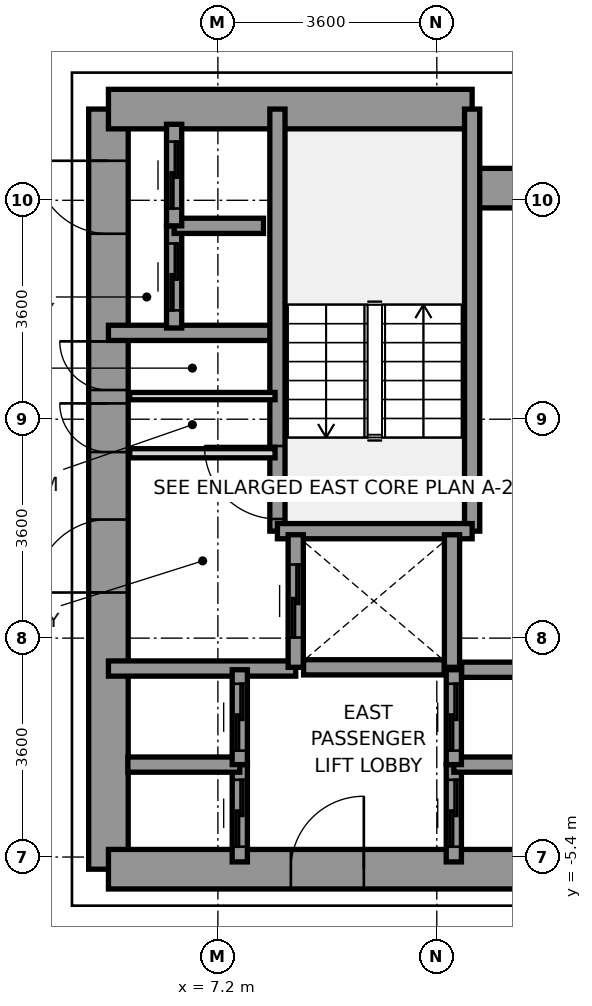
"""IFC4 building model, lengths in metres.
Left out: names, types, materials, properties, quantities, classifications, styles, units other than length and angle.
Written with IfcOpenShell. Run it as: python <this file> out.ifc"""

import sys

from ifc_helpers import new_model, si_unit, direction, frame, frame_2d, origin, place, context, subcontext, project, spatial, rectangle, extrude, source, transform, mapped, element, fill, save


model = new_model("IFC4")
c1 = context("Model", 3, precision=1e-05, world=origin(), true_north=direction((0.0, 1.0)))
c2 = subcontext(c1, "Body", "Model", "MODEL_VIEW")
j1 = project(units=[si_unit("LENGTHUNIT", "METRE"), si_unit("PLANEANGLEUNIT", "RADIAN")], contexts=[c1])
p1 = place(None, origin())
s1 = spatial("IfcSite", under=j1, at=p1, CompositionType="ELEMENT")
p2 = place(p1, origin())
s2 = spatial("IfcBuilding", under=s1, at=p2, CompositionType="ELEMENT")
p3 = place(p2, origin())
s3 = spatial("IfcBuildingStorey", under=s2, at=p3, CompositionType="ELEMENT", Elevation=0.0)
p4 = place(p3, frame((5.4, -5.6, 0.0), z_axis=(0.0, 0.0, 1.0), x_axis=(0.0, 1.0, 0.0)))
e1 = element("IfcWall", 1, at=p4, inside=s3, PredefinedType="SHEAR", context=c2, shape_type="SweptSolid", body=[
    extrude(rectangle(XDim=12.5, YDim=0.65, at=frame_2d((6.25, 0.0))), origin(), (0.0, 0.0, 1.0), 5.15),
])
p5 = place(p4, frame((4.55, 0.0, 0.0)))
e2 = element("IfcOpeningElement", 2, at=p5, cuts=e1, PredefinedType="OPENING", context=c2, shape_type="SweptSolid", body=[
    extrude(rectangle(XDim=1.2, YDim=2.2, at=frame_2d((0.6, 1.1))), frame((0.0, 0.335, 0.0), z_axis=(0.0, -1.0, 0.0), x_axis=(1.0, 0.0, 0.0)), (0.0, 0.0, 1.0), 0.67),
])
p6 = place(p4, frame((10.45, 0.0, 0.0)))
e3 = element("IfcOpeningElement", 3, at=p6, cuts=e1, PredefinedType="OPENING", context=c2, shape_type="SweptSolid", body=[
    extrude(rectangle(XDim=1.2, YDim=2.2, at=frame_2d((0.6, 1.1))), frame((0.0, 0.335, 0.0), z_axis=(0.0, -1.0, 0.0), x_axis=(1.0, 0.0, 0.0)), (0.0, 0.0, 1.0), 0.67),
])
p7 = place(p4, frame((6.86, 0.0, 0.0)))
e4 = element("IfcOpeningElement", 4, at=p7, cuts=e1, PredefinedType="OPENING", context=c2, shape_type="SweptSolid", body=[
    extrude(rectangle(XDim=0.8, YDim=2.1, at=frame_2d((0.4, 1.05))), frame((0.0, 0.335, 0.0), z_axis=(0.0, -1.0, 0.0), x_axis=(1.0, 0.0, 0.0)), (0.0, 0.0, 1.0), 0.67),
])
p8 = place(p4, frame((7.88, 0.0, 0.0)))
e5 = element("IfcOpeningElement", 5, at=p8, cuts=e1, PredefinedType="OPENING", context=c2, shape_type="SweptSolid", body=[
    extrude(rectangle(XDim=0.8, YDim=2.1, at=frame_2d((0.4, 1.05))), frame((0.0, 0.335, 0.0), z_axis=(0.0, -1.0, 0.0), x_axis=(1.0, 0.0, 0.0)), (0.0, 0.0, 1.0), 0.67),
])
p9 = place(p3, frame((5.4, 6.9, 0.0), z_axis=(0.0, 0.0, 1.0), x_axis=(1.0, 0.0, 0.0)))
e6 = element("IfcWall", 6, at=p9, inside=s3, PredefinedType="SHEAR", context=c2, shape_type="SweptSolid", body=[
    extrude(rectangle(XDim=5.981, YDim=0.65, at=frame_2d((2.991, 0.0))), origin(), (0.0, 0.0, 1.0), 5.15),
])
p10 = place(p3, frame((11.381, 5.6, 0.0), z_axis=(0.0, 0.0, 1.0), x_axis=(1.0, 0.0, 0.0)))
e7 = element("IfcWall", 7, at=p10, inside=s3, PredefinedType="SHEAR", context=c2, shape_type="SweptSolid", body=[
    extrude(rectangle(XDim=1.819, YDim=0.65, at=frame_2d((0.909, 0.0))), origin(), (0.0, 0.0, 1.0), 5.15),
])
p11 = place(p3, frame((5.4, -5.6, 0.0), z_axis=(0.0, 0.0, 1.0), x_axis=(1.0, 0.0, 0.0)))
e8 = element("IfcWall", 8, at=p11, inside=s3, PredefinedType="SHEAR", context=c2, shape_type="SweptSolid", body=[
    extrude(rectangle(XDim=7.8, YDim=0.65, at=frame_2d((3.9, 0.0))), origin(), (0.0, 0.0, 1.0), 5.15),
])
p12 = place(p11, frame((3.0, 0.0, 0.0)))
e9 = element("IfcOpeningElement", 9, at=p12, cuts=e8, PredefinedType="OPENING", context=c2, shape_type="SweptSolid", body=[
    extrude(rectangle(XDim=1.2, YDim=2.2, at=frame_2d((0.6, 1.1))), frame((0.0, 0.335, 0.0), z_axis=(0.0, -1.0, 0.0), x_axis=(1.0, 0.0, 0.0)), (0.0, 0.0, 1.0), 0.67),
])
p13 = place(p3, frame((5.4, 3.22, 0.0), z_axis=(0.0, 0.0, 1.0), x_axis=(1.0, 0.0, 0.0)))
e10 = element("IfcWall", 10, at=p13, inside=s3, PredefinedType="SOLIDWALL", context=c2, shape_type="SweptSolid", body=[
    extrude(rectangle(XDim=2.78, YDim=0.25, at=frame_2d((1.39, 0.0))), origin(), (0.0, 0.0, 1.0), 5.15),
])
p14 = place(p3, frame((5.4, -2.3, 0.0), z_axis=(0.0, 0.0, 1.0), x_axis=(1.0, 0.0, 0.0)))
e11 = element("IfcWall", 11, at=p14, inside=s3, PredefinedType="SOLIDWALL", context=c2, shape_type="SweptSolid", body=[
    extrude(rectangle(XDim=3.08, YDim=0.25, at=frame_2d((1.54, 0.0))), origin(), (0.0, 0.0, 1.0), 5.15),
])
p15 = place(p3, frame((8.179, -0.041, 0.0), z_axis=(0.0, 0.0, 1.0), x_axis=(0.0, 1.0, 0.0)))
e12 = element("IfcWall", 12, at=p15, inside=s3, PredefinedType="SOLIDWALL", context=c2, shape_type="SweptSolid", body=[
    extrude(rectangle(XDim=6.941, YDim=0.25, at=frame_2d((3.47, 0.0))), origin(), (0.0, 0.0, 1.0), 5.15),
])
p16 = place(p15, frame((0.2, 0.0, 0.0)))
e13 = element("IfcOpeningElement", 13, at=p16, cuts=e12, PredefinedType="OPENING", context=c2, shape_type="SweptSolid", body=[
    extrude(rectangle(XDim=1.2, YDim=2.2, at=frame_2d((0.6, 1.1))), frame((0.0, 0.135, 0.0), z_axis=(0.0, -1.0, 0.0), x_axis=(1.0, 0.0, 0.0)), (0.0, 0.0, 1.0), 0.27),
])
p17 = place(p3, frame((11.381, -0.041, 0.0), z_axis=(0.0, 0.0, 1.0), x_axis=(0.0, 1.0, 0.0)))
e14 = element("IfcWall", 14, at=p17, inside=s3, PredefinedType="SOLIDWALL", context=c2, shape_type="SweptSolid", body=[
    extrude(rectangle(XDim=6.941, YDim=0.25, at=frame_2d((3.47, 0.0))), origin(), (0.0, 0.0, 1.0), 5.15),
])
p18 = place(p3, frame((8.179, -0.041, 0.0), z_axis=(0.0, 0.0, 1.0), x_axis=(1.0, 0.0, 0.0)))
e15 = element("IfcWall", 15, at=p18, inside=s3, PredefinedType="SOLIDWALL", context=c2, shape_type="SweptSolid", body=[
    extrude(rectangle(XDim=3.202, YDim=0.25, at=frame_2d((1.601, 0.0))), origin(), (0.0, 0.0, 1.0), 5.15),
])
p19 = place(p3, frame((8.48, -2.28, 0.0), z_axis=(0.0, 0.0, 1.0), x_axis=(0.0, 1.0, 0.0)))
e16 = element("IfcWall", 16, at=p19, inside=s3, PredefinedType="SOLIDWALL", context=c2, shape_type="SweptSolid", body=[
    extrude(rectangle(XDim=2.18, YDim=0.25, at=frame_2d((1.09, 0.0))), origin(), (0.0, 0.0, 1.0), 5.15),
])
p20 = place(p19, frame((0.49, 0.0, 0.0)))
e17 = element("IfcOpeningElement", 17, at=p20, cuts=e16, PredefinedType="OPENING", context=c2, shape_type="SweptSolid", body=[
    extrude(rectangle(XDim=1.2, YDim=2.2, at=frame_2d((0.6, 1.1))), frame((0.0, 0.135, 0.0), z_axis=(0.0, -1.0, 0.0), x_axis=(1.0, 0.0, 0.0)), (0.0, 0.0, 1.0), 0.27),
])
p21 = place(p3, frame((11.05, -2.28, 0.0), z_axis=(0.0, 0.0, 1.0), x_axis=(0.0, 1.0, 0.0)))
e18 = element("IfcWall", 18, at=p21, inside=s3, PredefinedType="SOLIDWALL", context=c2, shape_type="SweptSolid", body=[
    extrude(rectangle(XDim=2.18, YDim=0.25, at=frame_2d((1.09, 0.0))), origin(), (0.0, 0.0, 1.0), 5.15),
])
p22 = place(p3, frame((8.609, -2.28, 0.0), z_axis=(0.0, 0.0, 1.0), x_axis=(1.0, 0.0, 0.0)))
e19 = element("IfcWall", 19, at=p22, inside=s3, PredefinedType="SOLIDWALL", context=c2, shape_type="SweptSolid", body=[
    extrude(rectangle(XDim=2.312, YDim=0.25, at=frame_2d((1.156, 0.0))), origin(), (0.0, 0.0, 1.0), 5.15),
])
p23 = place(p3, frame((11.08, -5.48, 0.0), z_axis=(0.0, 0.0, 1.0), x_axis=(0.0, 1.0, 0.0)))
e20 = element("IfcWall", 20, at=p23, inside=s3, PredefinedType="SOLIDWALL", context=c2, shape_type="SweptSolid", body=[
    extrude(rectangle(XDim=1.6, YDim=0.25, at=frame_2d((0.8, 0.0))), origin(), (0.0, 0.0, 1.0), 5.15),
])
p24 = place(p23, frame((0.25, 0.0, 0.0)))
e21 = element("IfcOpeningElement", 21, at=p24, cuts=e20, PredefinedType="OPENING", context=c2, shape_type="SweptSolid", body=[
    extrude(rectangle(XDim=1.1, YDim=2.2, at=frame_2d((0.55, 1.1))), frame((0.0, 0.135, 0.0), z_axis=(0.0, -1.0, 0.0), x_axis=(1.0, 0.0, 0.0)), (0.0, 0.0, 1.0), 0.27),
])
p25 = place(p3, frame((11.08, -3.88, 0.0), z_axis=(0.0, 0.0, 1.0), x_axis=(1.0, 0.0, 0.0)))
e22 = element("IfcWall", 22, at=p25, inside=s3, PredefinedType="SOLIDWALL", context=c2, shape_type="SweptSolid", body=[
    extrude(rectangle(XDim=1.84, YDim=0.25, at=frame_2d((0.92, 0.0))), origin(), (0.0, 0.0, 1.0), 5.15),
])
p26 = place(p3, frame((11.08, -3.88, 0.0), z_axis=(0.0, 0.0, 1.0), x_axis=(0.0, 1.0, 0.0)))
e23 = element("IfcWall", 23, at=p26, inside=s3, PredefinedType="SOLIDWALL", context=c2, shape_type="SweptSolid", body=[
    extrude(rectangle(XDim=1.56, YDim=0.25, at=frame_2d((0.78, 0.0))), origin(), (0.0, 0.0, 1.0), 5.15),
])
p27 = place(p26, frame((0.23, 0.0, 0.0)))
e24 = element("IfcOpeningElement", 24, at=p27, cuts=e23, PredefinedType="OPENING", context=c2, shape_type="SweptSolid", body=[
    extrude(rectangle(XDim=1.1, YDim=2.2, at=frame_2d((0.55, 1.1))), frame((0.0, 0.135, 0.0), z_axis=(0.0, -1.0, 0.0), x_axis=(1.0, 0.0, 0.0)), (0.0, 0.0, 1.0), 0.27),
])
p28 = place(p3, frame((11.209, -2.32, 0.0), z_axis=(0.0, 0.0, 1.0), x_axis=(1.0, 0.0, 0.0)))
e25 = element("IfcWall", 25, at=p28, inside=s3, PredefinedType="SOLIDWALL", context=c2, shape_type="SweptSolid", body=[
    extrude(rectangle(XDim=1.582, YDim=0.25, at=frame_2d((0.791, 0.0))), origin(), (0.0, 0.0, 1.0), 5.15),
])
p29 = place(p3, frame((7.56, -5.48, 0.0), z_axis=(0.0, 0.0, 1.0), x_axis=(0.0, 1.0, 0.0)))
e26 = element("IfcWall", 26, at=p29, inside=s3, PredefinedType="SOLIDWALL", context=c2, shape_type="SweptSolid", body=[
    extrude(rectangle(XDim=1.6, YDim=0.25, at=frame_2d((0.8, 0.0))), origin(), (0.0, 0.0, 1.0), 5.15),
])
p30 = place(p29, frame((0.25, 0.0, 0.0)))
e27 = element("IfcOpeningElement", 27, at=p30, cuts=e26, PredefinedType="OPENING", context=c2, shape_type="SweptSolid", body=[
    extrude(rectangle(XDim=1.1, YDim=2.2, at=frame_2d((0.55, 1.1))), frame((0.0, 0.135, 0.0), z_axis=(0.0, -1.0, 0.0), x_axis=(1.0, 0.0, 0.0)), (0.0, 0.0, 1.0), 0.27),
])
p31 = place(p3, frame((5.72, -3.88, 0.0), z_axis=(0.0, 0.0, 1.0), x_axis=(1.0, 0.0, 0.0)))
e28 = element("IfcWall", 28, at=p31, inside=s3, PredefinedType="SOLIDWALL", context=c2, shape_type="SweptSolid", body=[
    extrude(rectangle(XDim=1.84, YDim=0.25, at=frame_2d((0.92, 0.0))), origin(), (0.0, 0.0, 1.0), 5.15),
])
p32 = place(p3, frame((7.56, -3.88, 0.0), z_axis=(0.0, 0.0, 1.0), x_axis=(0.0, 1.0, 0.0)))
e29 = element("IfcWall", 29, at=p32, inside=s3, PredefinedType="SOLIDWALL", context=c2, shape_type="SweptSolid", body=[
    extrude(rectangle(XDim=1.56, YDim=0.25, at=frame_2d((0.78, 0.0))), origin(), (0.0, 0.0, 1.0), 5.15),
])
p33 = place(p32, frame((0.23, 0.0, 0.0)))
e30 = element("IfcOpeningElement", 30, at=p33, cuts=e29, PredefinedType="OPENING", context=c2, shape_type="SweptSolid", body=[
    extrude(rectangle(XDim=1.1, YDim=2.2, at=frame_2d((0.55, 1.1))), frame((0.0, 0.135, 0.0), z_axis=(0.0, -1.0, 0.0), x_axis=(1.0, 0.0, 0.0)), (0.0, 0.0, 1.0), 0.27),
])
p34 = place(p3, frame((6.48, 3.3, 0.0), z_axis=(0.0, 0.0, 1.0), x_axis=(0.0, 1.0, 0.0)))
e31 = element("IfcWall", 31, at=p34, inside=s3, PredefinedType="SOLIDWALL", context=c2, shape_type="SweptSolid", body=[
    extrude(rectangle(XDim=1.68, YDim=0.25, at=frame_2d((0.84, 0.0))), origin(), (0.0, 0.0, 1.0), 5.15),
])
p35 = place(p34, frame((0.29, 0.0, 0.0)))
e32 = element("IfcOpeningElement", 32, at=p35, cuts=e31, PredefinedType="OPENING", context=c2, shape_type="SweptSolid", body=[
    extrude(rectangle(XDim=1.1, YDim=2.2, at=frame_2d((0.55, 1.1))), frame((0.0, 0.135, 0.0), z_axis=(0.0, -1.0, 0.0), x_axis=(1.0, 0.0, 0.0)), (0.0, 0.0, 1.0), 0.27),
])
p36 = place(p3, frame((6.48, 4.98, 0.0), z_axis=(0.0, 0.0, 1.0), x_axis=(1.0, 0.0, 0.0)))
e33 = element("IfcWall", 33, at=p36, inside=s3, PredefinedType="SOLIDWALL", context=c2, shape_type="SweptSolid", body=[
    extrude(rectangle(XDim=1.47, YDim=0.25, at=frame_2d((0.735, 0.0))), origin(), (0.0, 0.0, 1.0), 5.15),
])
p37 = place(p3, frame((6.48, 4.98, 0.0), z_axis=(0.0, 0.0, 1.0), x_axis=(0.0, 1.0, 0.0)))
e34 = element("IfcWall", 34, at=p37, inside=s3, PredefinedType="SOLIDWALL", context=c2, shape_type="SweptSolid", body=[
    extrude(rectangle(XDim=1.67, YDim=0.25, at=frame_2d((0.835, 0.0))), origin(), (0.0, 0.0, 1.0), 5.15),
])
p38 = place(p37, frame((0.285, 0.0, 0.0)))
e35 = element("IfcOpeningElement", 35, at=p38, cuts=e34, PredefinedType="OPENING", context=c2, shape_type="SweptSolid", body=[
    extrude(rectangle(XDim=1.1, YDim=2.2, at=frame_2d((0.55, 1.1))), frame((0.0, 0.135, 0.0), z_axis=(0.0, -1.0, 0.0), x_axis=(1.0, 0.0, 0.0)), (0.0, 0.0, 1.0), 0.27),
])
p39 = place(p3, frame((5.75, 1.24, 0.0), z_axis=(0.0, 0.0, 1.0), x_axis=(1.0, 0.0, 0.0)))
e36 = element("IfcWall", 36, at=p39, inside=s3, PredefinedType="PARTITIONING", context=c2, shape_type="SweptSolid", body=[
    extrude(rectangle(XDim=2.39, YDim=0.15, at=frame_2d((1.195, 0.0))), origin(), (0.0, 0.0, 1.0), 4.25),
])
p40 = place(p3, frame((5.75, 2.18, 0.0), z_axis=(0.0, 0.0, 1.0), x_axis=(1.0, 0.0, 0.0)))
e37 = element("IfcWall", 37, at=p40, inside=s3, PredefinedType="PARTITIONING", context=c2, shape_type="SweptSolid", body=[
    extrude(rectangle(XDim=2.39, YDim=0.12, at=frame_2d((1.195, 0.0))), origin(), (0.0, 0.0, 1.0), 4.25),
])
m1 = source(origin(), c2, "Body", "SweptSolid", [
    extrude(rectangle(XDim=1.2, YDim=2.2, at=frame_2d((0.6, 1.1))), frame((0.0, 0.025, 0.0), z_axis=(0.0, -1.0, 0.0), x_axis=(1.0, 0.0, 0.0)), (0.0, 0.0, 1.0), 0.05),
])
p41 = place(p16, origin())
e38 = element("IfcDoor", 38, at=p41, inside=s3, OperationType="SINGLE_SWING_RIGHT", PredefinedType="DOOR", context=c2, shape_type="MappedRepresentation", body=[
    mapped(m1, transform((0.0, 0.0, 0.0), x_axis=(1.0, 0.0, 0.0), y_axis=(0.0, 1.0, 0.0), z_axis=(0.0, 0.0, 1.0), scale=1.0)),
])
fill(e13, e38)
p42 = place(p5, origin())
e39 = element("IfcDoor", 39, at=p42, inside=s3, OperationType="SINGLE_SWING_LEFT", PredefinedType="DOOR", context=c2, shape_type="MappedRepresentation", body=[
    mapped(m1, transform((0.0, 0.0, 0.0), x_axis=(1.0, 0.0, 0.0), y_axis=(0.0, 1.0, 0.0), z_axis=(0.0, 0.0, 1.0), scale=1.0)),
])
fill(e2, e39)
p43 = place(p6, origin())
e40 = element("IfcDoor", 40, at=p43, inside=s3, OperationType="SINGLE_SWING_RIGHT", PredefinedType="DOOR", context=c2, shape_type="MappedRepresentation", body=[
    mapped(m1, transform((0.0, 0.0, 0.0), x_axis=(1.0, 0.0, 0.0), y_axis=(0.0, 1.0, 0.0), z_axis=(0.0, 0.0, 1.0), scale=1.0)),
])
fill(e3, e40)
p44 = place(p12, origin())
e41 = element("IfcDoor", 41, at=p44, inside=s3, OperationType="SINGLE_SWING_RIGHT", PredefinedType="DOOR", context=c2, shape_type="MappedRepresentation", body=[
    mapped(m1, transform((0.0, 0.0, 0.0), x_axis=(1.0, 0.0, 0.0), y_axis=(0.0, 1.0, 0.0), z_axis=(0.0, 0.0, 1.0), scale=1.0)),
])
fill(e9, e41)
m2 = source(origin(), c2, "Body", "SweptSolid", [
    extrude(rectangle(XDim=0.8, YDim=2.1, at=frame_2d((0.4, 1.05))), frame((0.0, 0.025, 0.0), z_axis=(0.0, -1.0, 0.0), x_axis=(1.0, 0.0, 0.0)), (0.0, 0.0, 1.0), 0.05),
])
p45 = place(p7, origin())
e42 = element("IfcDoor", 42, at=p45, inside=s3, OperationType="SINGLE_SWING_RIGHT", PredefinedType="DOOR", context=c2, shape_type="MappedRepresentation", body=[
    mapped(m2, transform((0.0, 0.0, 0.0), x_axis=(1.0, 0.0, 0.0), y_axis=(0.0, 1.0, 0.0), z_axis=(0.0, 0.0, 1.0), scale=1.0)),
])
fill(e4, e42)
p46 = place(p8, origin())
e43 = element("IfcDoor", 43, at=p46, inside=s3, OperationType="SINGLE_SWING_RIGHT", PredefinedType="DOOR", context=c2, shape_type="MappedRepresentation", body=[
    mapped(m2, transform((0.0, 0.0, 0.0), x_axis=(1.0, 0.0, 0.0), y_axis=(0.0, 1.0, 0.0), z_axis=(0.0, 0.0, 1.0), scale=1.0)),
])
fill(e5, e43)
p47 = place(p20, origin())
e44 = element("IfcDoor", 44, at=p47, inside=s3, OperationType="SLIDING_TO_RIGHT", PredefinedType="DOOR", context=c2, shape_type="MappedRepresentation", body=[
    mapped(m1, transform((0.0, 0.0, 0.0), x_axis=(1.0, 0.0, 0.0), y_axis=(0.0, 1.0, 0.0), z_axis=(0.0, 0.0, 1.0), scale=1.0)),
])
fill(e17, e44)
m3 = source(origin(), c2, "Body", "SweptSolid", [
    extrude(rectangle(XDim=1.1, YDim=2.2, at=frame_2d((0.55, 1.1))), frame((0.0, 0.025, 0.0), z_axis=(0.0, -1.0, 0.0), x_axis=(1.0, 0.0, 0.0)), (0.0, 0.0, 1.0), 0.05),
])
p48 = place(p24, origin())
e45 = element("IfcDoor", 45, at=p48, inside=s3, OperationType="SLIDING_TO_LEFT", PredefinedType="DOOR", context=c2, shape_type="MappedRepresentation", body=[
    mapped(m3, transform((0.0, 0.0, 0.0), x_axis=(1.0, 0.0, 0.0), y_axis=(0.0, 1.0, 0.0), z_axis=(0.0, 0.0, 1.0), scale=1.0)),
])
fill(e21, e45)
p49 = place(p27, origin())
e46 = element("IfcDoor", 46, at=p49, inside=s3, OperationType="SLIDING_TO_LEFT", PredefinedType="DOOR", context=c2, shape_type="MappedRepresentation", body=[
    mapped(m3, transform((0.0, 0.0, 0.0), x_axis=(1.0, 0.0, 0.0), y_axis=(0.0, 1.0, 0.0), z_axis=(0.0, 0.0, 1.0), scale=1.0)),
])
fill(e24, e46)
p50 = place(p30, origin())
e47 = element("IfcDoor", 47, at=p50, inside=s3, OperationType="SLIDING_TO_LEFT", PredefinedType="DOOR", context=c2, shape_type="MappedRepresentation", body=[
    mapped(m3, transform((0.0, 0.0, 0.0), x_axis=(1.0, 0.0, 0.0), y_axis=(0.0, 1.0, 0.0), z_axis=(0.0, 0.0, 1.0), scale=1.0)),
])
fill(e27, e47)
p51 = place(p33, origin())
e48 = element("IfcDoor", 48, at=p51, inside=s3, OperationType="SLIDING_TO_LEFT", PredefinedType="DOOR", context=c2, shape_type="MappedRepresentation", body=[
    mapped(m3, transform((0.0, 0.0, 0.0), x_axis=(1.0, 0.0, 0.0), y_axis=(0.0, 1.0, 0.0), z_axis=(0.0, 0.0, 1.0), scale=1.0)),
])
fill(e30, e48)
p52 = place(p35, origin())
e49 = element("IfcDoor", 49, at=p52, inside=s3, OperationType="SLIDING_TO_LEFT", PredefinedType="DOOR", context=c2, shape_type="MappedRepresentation", body=[
    mapped(m3, transform((0.0, 0.0, 0.0), x_axis=(1.0, 0.0, 0.0), y_axis=(0.0, 1.0, 0.0), z_axis=(0.0, 0.0, 1.0), scale=1.0)),
])
fill(e32, e49)
p53 = place(p38, origin())
e50 = element("IfcDoor", 50, at=p53, inside=s3, OperationType="SLIDING_TO_LEFT", PredefinedType="DOOR", context=c2, shape_type="MappedRepresentation", body=[
    mapped(m3, transform((0.0, 0.0, 0.0), x_axis=(1.0, 0.0, 0.0), y_axis=(0.0, 1.0, 0.0), z_axis=(0.0, 0.0, 1.0), scale=1.0)),
])
fill(e35, e50)
save(model, sys.argv[1])
